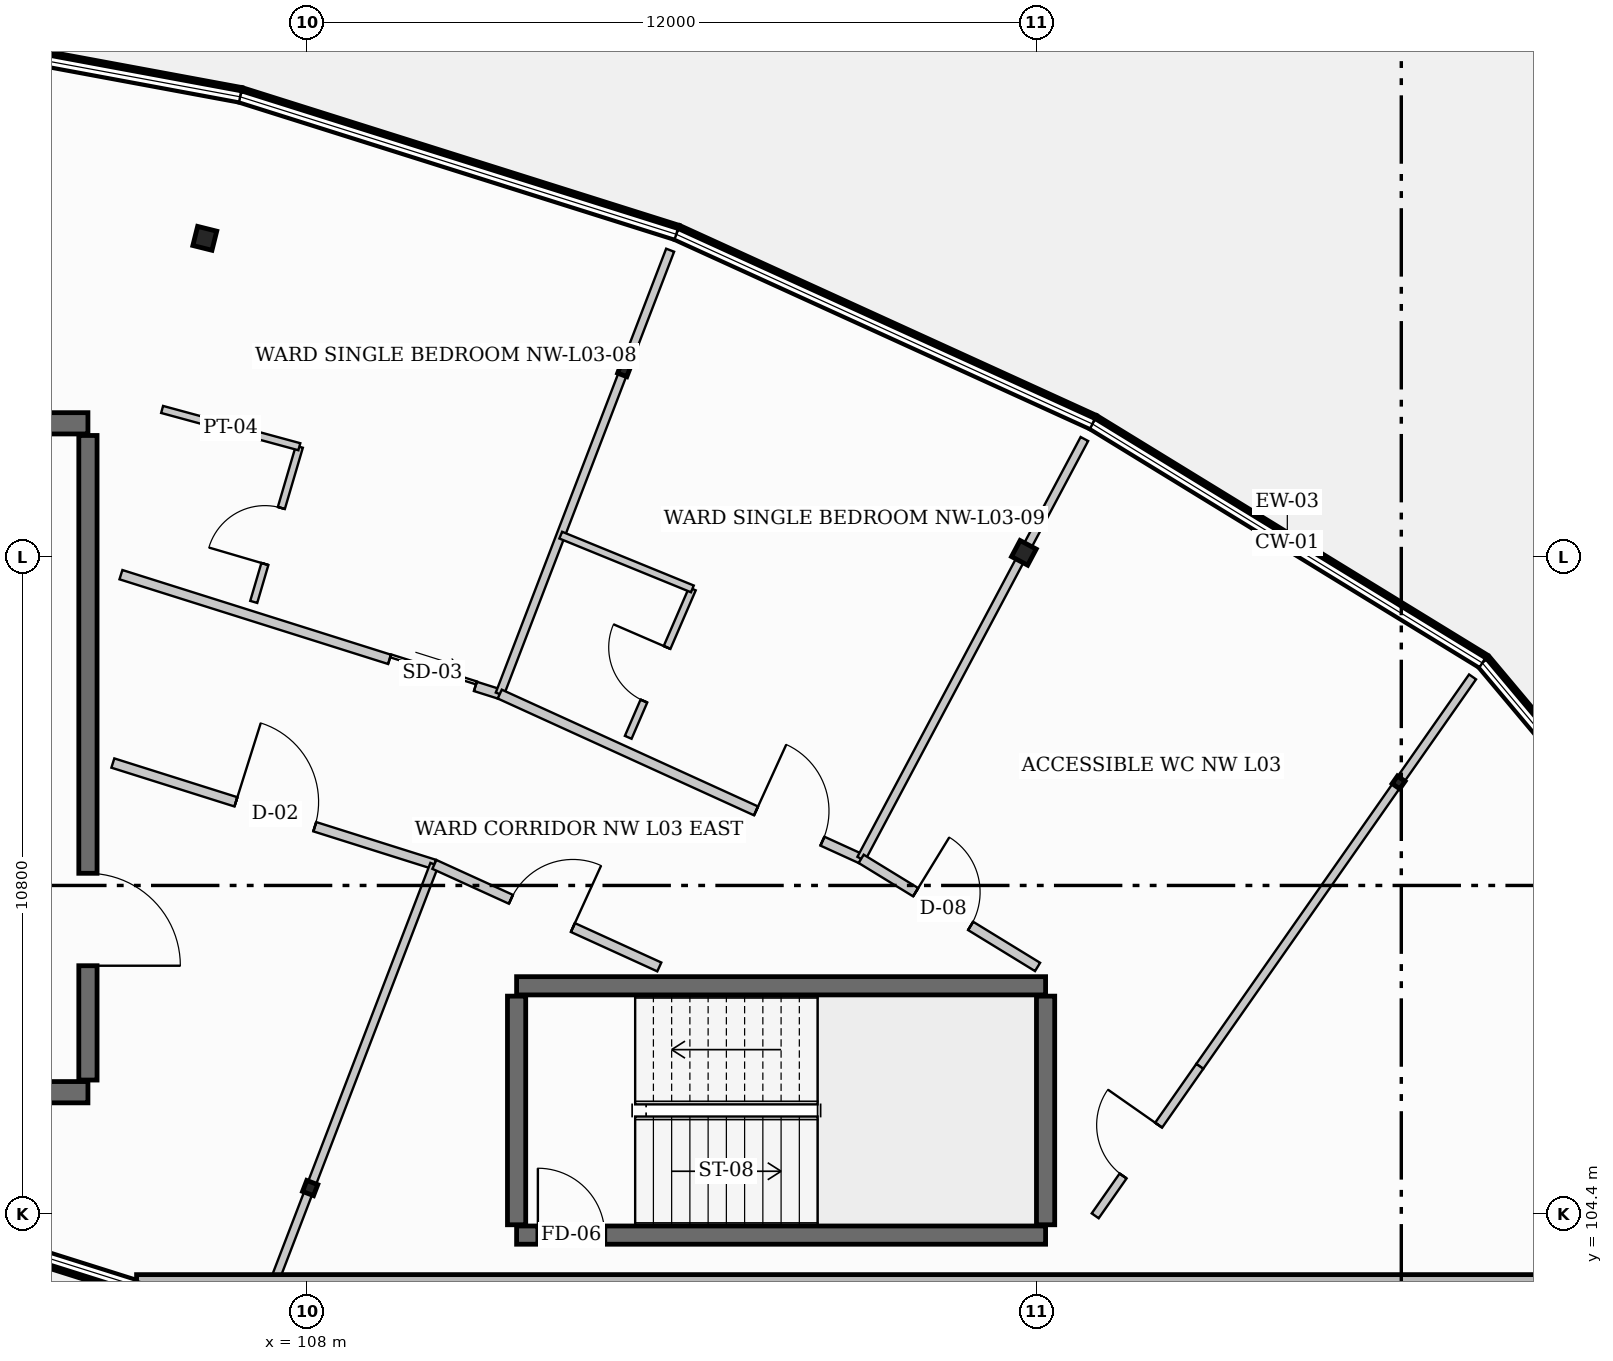
"""IFC4 building model, lengths in metres.
Left out: names, types, materials, properties, quantities, classifications, styles, units other than length and angle.
Written with IfcOpenShell. Run it as: python <this file> out.ifc"""

import sys

from ifc_helpers import new_model, si_unit, direction, frame, frame_2d, origin, origin_2d, place, context, subcontext, project, spatial, rectangle, hollow_rectangle, hollow_circle, i_section, extrude, element, fill, save


model = new_model("IFC4")
c1 = context("Model", 3, precision=1e-05, world=origin(), true_north=direction((0.0, 1.0)))
c2 = subcontext(c1, "Body", "Model", "MODEL_VIEW")
j1 = project(units=[si_unit("LENGTHUNIT", "METRE"), si_unit("PLANEANGLEUNIT", "RADIAN")], contexts=[c1])
p1 = place(None, origin())
s1 = spatial("IfcSite", under=j1, at=p1, CompositionType="ELEMENT")
p2 = place(p1, origin())
s2 = spatial("IfcBuilding", under=s1, at=p2, CompositionType="ELEMENT")
p3 = place(p2, frame((0.0, 0.0, 14.4)))
s3 = spatial("IfcBuildingStorey", under=s2, at=p3, CompositionType="ELEMENT", Elevation=14.4)
p4 = place(p3, frame((106.322, 120.442, 0.0), z_axis=(0.0, 0.0, 1.0), x_axis=(0.2419218956, 0.970295726276, 0.0)))
e1 = element("IfcColumn", 1, at=p4, inside=s3, PredefinedType="COLUMN", context=c2, shape_type="SweptSolid", body=[
    extrude(hollow_circle(Radius=0.162, WallThickness=0.013, at=origin_2d()), origin(), (0.0, 0.0, 1.0), 3.9),
])
p5 = place(p3, frame((113.215, 118.268, 0.0), z_axis=(0.0, 0.0, 1.0), x_axis=(0.358367949545, 0.933580426497, 0.0)))
e2 = element("IfcColumn", 2, at=p5, inside=s3, PredefinedType="COLUMN", context=c2, shape_type="SweptSolid", body=[
    extrude(i_section(OverallWidth=0.154, OverallDepth=0.162, WebThickness=0.008, FlangeThickness=0.011, at=origin_2d()), origin(), (0.0, 0.0, 1.0), 3.9),
])
p6 = place(p3, frame((108.055, 104.824, 0.0), z_axis=(0.0, 0.0, 1.0), x_axis=(0.358367949545, 0.933580426497, 0.0)))
e3 = element("IfcColumn", 3, at=p6, inside=s3, PredefinedType="COLUMN", context=c2, shape_type="SweptSolid", body=[
    extrude(hollow_circle(Radius=0.097, WallThickness=0.008, at=origin_2d()), origin(), (0.0, 0.0, 1.0), 3.9),
])
p7 = place(p3, frame((119.793, 115.27, 0.0), z_axis=(0.0, 0.0, 1.0), x_axis=(0.469471562786, 0.882947592859, 0.0)))
e4 = element("IfcColumn", 4, at=p7, inside=s3, PredefinedType="COLUMN", context=c2, shape_type="SweptSolid", body=[
    extrude(hollow_rectangle(XDim=0.3, YDim=0.3, WallThickness=0.012, at=origin_2d()), origin(), (0.0, 0.0, 1.0), 3.9),
])
p8 = place(p3, frame((125.956, 111.494, 0.0), z_axis=(0.0, 0.0, 1.0), x_axis=(0.573576436351, 0.819152044289, 0.0)))
e5 = element("IfcColumn", 5, at=p8, inside=s3, PredefinedType="COLUMN", context=c2, shape_type="SweptSolid", body=[
    extrude(i_section(OverallWidth=0.152, OverallDepth=0.152, WebThickness=0.006, FlangeThickness=0.007, at=origin_2d()), origin(), (0.0, 0.0, 1.0), 3.9),
])
p9 = place(p3, frame((84.0, 117.4, 0.0), z_axis=(0.0, 0.0, 1.0), x_axis=(1.0, 0.0, 0.0)))
e6 = element("IfcWall", 6, at=p9, inside=s3, PredefinedType="SHEAR", context=c2, shape_type="SweptSolid", body=[
    extrude(rectangle(XDim=20.4, YDim=0.35, at=frame_2d((10.2, 0.0))), origin(), (0.0, 0.0, 1.0), 3.9),
])
p10 = place(p3, frame((104.4, 106.4, 0.0), z_axis=(0.0, 0.0, 1.0), x_axis=(-1.0, 0.0, 0.0)))
e7 = element("IfcWall", 7, at=p10, inside=s3, PredefinedType="SHEAR", context=c2, shape_type="SweptSolid", body=[
    extrude(rectangle(XDim=20.4, YDim=0.35, at=frame_2d((10.2, 0.0))), origin(), (0.0, 0.0, 1.0), 3.9),
])
p11 = place(p10, frame((2.2, 0.0, 0.0)))
e8 = element("IfcOpeningElement", 8, at=p11, cuts=e7, PredefinedType="OPENING", context=c2, shape_type="SweptSolid", body=[
    extrude(rectangle(XDim=1.64, YDim=2.2, at=frame_2d((0.82, 1.1))), frame((0.0, 0.185, 0.0), z_axis=(0.0, -1.0, 0.0), x_axis=(1.0, 0.0, 0.0)), (0.0, 0.0, 1.0), 0.37),
])
p12 = place(p10, frame((13.0, 0.0, 0.0)))
e9 = element("IfcOpeningElement", 9, at=p12, cuts=e7, PredefinedType="OPENING", context=c2, shape_type="SweptSolid", body=[
    extrude(rectangle(XDim=1.52, YDim=2.16, at=frame_2d((0.76, 1.08))), frame((0.0, 0.185, 0.0), z_axis=(0.0, -1.0, 0.0), x_axis=(1.0, 0.0, 0.0)), (0.0, 0.0, 1.0), 0.37),
])
p13 = place(p3, frame((104.4, 117.2, 0.0), z_axis=(0.0, 0.0, 1.0), x_axis=(0.0, -1.0, 0.0)))
e10 = element("IfcWall", 10, at=p13, inside=s3, PredefinedType="SHEAR", context=c2, shape_type="SweptSolid", body=[
    extrude(rectangle(XDim=10.6, YDim=0.3, at=frame_2d((5.3, 0.0))), origin(), (0.0, 0.0, 1.0), 3.9),
])
p14 = place(p13, frame((7.2, 0.0, 0.0)))
e11 = element("IfcOpeningElement", 11, at=p14, cuts=e10, PredefinedType="OPENING", context=c2, shape_type="SweptSolid", body=[
    extrude(rectangle(XDim=1.52, YDim=2.16, at=frame_2d((0.76, 1.08))), frame((0.0, 0.16, 0.0), z_axis=(0.0, -1.0, 0.0), x_axis=(1.0, 0.0, 0.0)), (0.0, 0.0, 1.0), 0.32),
])
p15 = place(p3, frame((111.45, 104.05, 0.0), z_axis=(0.0, 0.0, 1.0), x_axis=(1.0, 0.0, 0.0)))
e12 = element("IfcWall", 12, at=p15, inside=s3, PredefinedType="SHEAR", context=c2, shape_type="SweptSolid", body=[
    extrude(rectangle(XDim=8.7, YDim=0.3, at=frame_2d((4.35, 0.0))), origin(), (0.0, 0.0, 1.0), 3.9),
])
p16 = place(p15, frame((0.35, 0.0, 0.0)))
e13 = element("IfcOpeningElement", 13, at=p16, cuts=e12, PredefinedType="OPENING", context=c2, shape_type="SweptSolid", body=[
    extrude(rectangle(XDim=1.1, YDim=2.15, at=frame_2d((0.55, 1.075))), frame((0.0, 0.16, 0.0), z_axis=(0.0, -1.0, 0.0), x_axis=(1.0, 0.0, 0.0)), (0.0, 0.0, 1.0), 0.32),
])
p17 = place(p3, frame((120.15, 108.15, 0.0), z_axis=(0.0, 0.0, 1.0), x_axis=(-1.0, 0.0, 0.0)))
e14 = element("IfcWall", 14, at=p17, inside=s3, PredefinedType="SHEAR", context=c2, shape_type="SweptSolid", body=[
    extrude(rectangle(XDim=8.7, YDim=0.3, at=frame_2d((4.35, 0.0))), origin(), (0.0, 0.0, 1.0), 3.9),
])
for number, where, z_axis, x_axis in (
    (15, (111.45, 104.22, 0.0), (0.0, 0.0, 1.0), (0.0, 1.0, 0.0)),
    (16, (120.15, 104.22, 0.0), (0.0, 0.0, 1.0), (0.0, 1.0, 0.0)),
):
    element("IfcWall", number, at=place(p3, frame(where, z_axis=z_axis, x_axis=x_axis)), inside=s3, PredefinedType="SHEAR", context=c2, shape_type="SweptSolid", body=[
        extrude(rectangle(XDim=3.76, YDim=0.3, at=frame_2d((1.88, 0.0))), origin(), (0.0, 0.0, 1.0), 3.9),
    ])
p18 = place(p3, frame((107.195, 102.584, 0.0), z_axis=(0.0, 0.0, 1.0), x_axis=(-0.953706582316, 0.300738681994, 0.0)))
e17 = element("IfcWall", 17, at=p18, inside=s3, PredefinedType="STANDARD", context=c2, shape_type="SweptSolid", body=[
    extrude(rectangle(XDim=5.178, YDim=0.22, at=frame_2d((2.589, 0.0))), origin(), (0.0, 0.0, 1.0), 1.05),
])
p19 = place(p3, frame((127.332, 113.46, 0.0), z_axis=(0.0, 0.0, 1.0), x_axis=(0.642871763415, -0.765973821879, 0.0)))
e18 = element("IfcWall", 18, at=p19, inside=s3, PredefinedType="STANDARD", context=c2, shape_type="SweptSolid", body=[
    extrude(rectangle(XDim=4.97, YDim=0.22, at=frame_2d((2.485, 0.0))), origin(), (0.0, 0.0, 1.0), 1.05),
])
p20 = place(p3, frame((120.919, 117.39, 0.0), z_axis=(0.0, 0.0, 1.0), x_axis=(0.852640903338, -0.522497358803, 0.0)))
e19 = element("IfcWall", 19, at=p20, inside=s3, PredefinedType="STANDARD", context=c2, shape_type="SweptSolid", body=[
    extrude(rectangle(XDim=7.521, YDim=0.22, at=frame_2d((3.761, 0.0))), origin(), (0.0, 0.0, 1.0), 1.05),
])
p21 = place(p3, frame((114.075, 120.509, 0.0), z_axis=(0.0, 0.0, 1.0), x_axis=(0.909953604353, -0.414710064895, 0.0)))
e20 = element("IfcWall", 20, at=p21, inside=s3, PredefinedType="STANDARD", context=c2, shape_type="SweptSolid", body=[
    extrude(rectangle(XDim=7.521, YDim=0.22, at=frame_2d((3.761, 0.0))), origin(), (0.0, 0.0, 1.0), 1.05),
])
p22 = place(p3, frame((106.902, 122.77, 0.0), z_axis=(0.0, 0.0, 1.0), x_axis=(0.953740021466, -0.300632618747, 0.0)))
e21 = element("IfcWall", 21, at=p22, inside=s3, PredefinedType="STANDARD", context=c2, shape_type="SweptSolid", body=[
    extrude(rectangle(XDim=7.521, YDim=0.22, at=frame_2d((3.76, 0.0))), origin(), (0.0, 0.0, 1.0), 1.05),
])
p23 = place(p3, frame((99.507, 124.141, 0.0), z_axis=(0.0, 0.0, 1.0), x_axis=(0.983242805192, -0.18230081195, 0.0)))
e22 = element("IfcWall", 22, at=p23, inside=s3, PredefinedType="STANDARD", context=c2, shape_type="SweptSolid", body=[
    extrude(rectangle(XDim=7.521, YDim=0.22, at=frame_2d((3.76, 0.0))), origin(), (0.0, 0.0, 1.0), 1.05),
])
p24 = place(p3, frame((107.127, 114.463, 0.0), z_axis=(0.0, 0.0, 1.0), x_axis=(0.281962578993, 0.959425403066, 0.0)))
e23 = element("IfcWall", 23, at=p24, inside=s3, PredefinedType="PARTITIONING", context=c2, shape_type="SweptSolid", body=[
    extrude(rectangle(XDim=2.66, YDim=0.12, at=frame_2d((1.33, 0.0))), origin(), (0.0, 0.0, 1.0), 3.289),
])
p25 = place(p24, frame((0.65, 0.0, 0.0)))
e24 = element("IfcOpeningElement", 24, at=p25, cuts=e23, PredefinedType="OPENING", context=c2, shape_type="SweptSolid", body=[
    extrude(rectangle(XDim=0.96, YDim=2.06, at=frame_2d((0.48, 1.03))), frame((0.0, 0.07, 0.0), z_axis=(0.0, -1.0, 0.0), x_axis=(1.0, 0.0, 0.0)), (0.0, 0.0, 1.0), 0.14),
])
p26 = place(p3, frame((105.62, 117.628, 0.0), z_axis=(0.0, 0.0, 1.0), x_axis=(0.965030735715, -0.262136756532, 0.0)))
e25 = element("IfcWall", 25, at=p26, inside=s3, PredefinedType="PARTITIONING", context=c2, shape_type="SweptSolid", body=[
    extrude(rectangle(XDim=2.339, YDim=0.12, at=frame_2d((1.169, 0.0))), origin(), (0.0, 0.0, 1.0), 3.085),
])
p27 = place(p3, frame((104.943, 114.911, 0.0), z_axis=(0.0, 0.0, 1.0), x_axis=(0.953736183483, -0.30064479426, 0.0)))
e26 = element("IfcWall", 26, at=p27, inside=s3, PredefinedType="PARTITIONING", context=c2, shape_type="SweptSolid", body=[
    extrude(rectangle(XDim=6.532, YDim=0.16, at=frame_2d((3.266, 0.0))), origin(), (0.0, 0.0, 1.0), 3.085),
])
p28 = place(p27, frame((4.632, 0.0, 0.0)))
e27 = element("IfcOpeningElement", 27, at=p28, cuts=e26, PredefinedType="OPENING", context=c2, shape_type="SweptSolid", body=[
    extrude(rectangle(XDim=1.48, YDim=2.26, at=frame_2d((0.74, 1.13))), frame((0.0, 0.09, 0.0), z_axis=(0.0, -1.0, 0.0), x_axis=(1.0, 0.0, 0.0)), (0.0, 0.0, 1.0), 0.18),
])
p29 = place(p3, frame((111.173, 112.947, 0.0), z_axis=(0.0, 0.0, 1.0), x_axis=(0.358342954102, 0.933590020965, 0.0)))
e28 = element("IfcWall", 28, at=p29, inside=s3, PredefinedType="PARTITIONING", context=c2, shape_type="SweptSolid", body=[
    extrude(rectangle(XDim=7.819, YDim=0.14, at=frame_2d((3.91, 0.0))), origin(), (0.0, 0.0, 1.0), 3.088),
])
p30 = place(p3, frame((104.81, 111.813, 0.0), z_axis=(0.0, 0.0, 1.0), x_axis=(0.953730291319, -0.300663485347, 0.0)))
e29 = element("IfcWall", 29, at=p30, inside=s3, PredefinedType="PARTITIONING", context=c2, shape_type="SweptSolid", body=[
    extrude(rectangle(XDim=5.544, YDim=0.16, at=frame_2d((2.772, 0.0))), origin(), (0.0, 0.0, 1.0), 3.088),
])
p31 = place(p30, frame((2.122, 0.0, 0.0)))
e30 = element("IfcOpeningElement", 30, at=p31, cuts=e29, PredefinedType="OPENING", context=c2, shape_type="SweptSolid", body=[
    extrude(rectangle(XDim=1.36, YDim=2.18, at=frame_2d((0.68, 1.09))), frame((0.0, 0.09, 0.0), z_axis=(0.0, -1.0, 0.0), x_axis=(1.0, 0.0, 0.0)), (0.0, 0.0, 1.0), 0.18),
])
p32 = place(p3, frame((110.098, 110.146, 0.0), z_axis=(0.0, 0.0, 1.0), x_axis=(-0.358410014332, -0.933564278251, 0.0)))
e31 = element("IfcWall", 31, at=p32, inside=s3, PredefinedType="PARTITIONING", context=c2, shape_type="SweptSolid", body=[
    extrude(rectangle(XDim=7.821, YDim=0.14, at=frame_2d((3.91, 0.0))), origin(), (0.0, 0.0, 1.0), 3.088),
])
p33 = place(p3, frame((113.286, 112.236, 0.0), z_axis=(0.0, 0.0, 1.0), x_axis=(0.396798265053, 0.917905843129, 0.0)))
e32 = element("IfcWall", 32, at=p33, inside=s3, PredefinedType="PARTITIONING", context=c2, shape_type="SweptSolid", body=[
    extrude(rectangle(XDim=2.659, YDim=0.12, at=frame_2d((1.33, 0.0))), origin(), (0.0, 0.0, 1.0), 3.56),
])
p34 = place(p33, frame((0.65, 0.0, 0.0)))
e33 = element("IfcOpeningElement", 33, at=p34, cuts=e32, PredefinedType="OPENING", context=c2, shape_type="SweptSolid", body=[
    extrude(rectangle(XDim=0.96, YDim=2.06, at=frame_2d((0.48, 1.03))), frame((0.0, 0.07, 0.0), z_axis=(0.0, -1.0, 0.0), x_axis=(1.0, 0.0, 0.0)), (0.0, 0.0, 1.0), 0.14),
])
p35 = place(p3, frame((112.176, 115.561, 0.0), z_axis=(0.0, 0.0, 1.0), x_axis=(0.925796200481, -0.378023008789, 0.0)))
e34 = element("IfcWall", 34, at=p35, inside=s3, PredefinedType="PARTITIONING", context=c2, shape_type="SweptSolid", body=[
    extrude(rectangle(XDim=2.339, YDim=0.12, at=frame_2d((1.169, 0.0))), origin(), (0.0, 0.0, 1.0), 3.088),
])
p36 = place(p3, frame((111.173, 112.947, 0.0), z_axis=(0.0, 0.0, 1.0), x_axis=(0.909948737979, -0.414720742488, 0.0)))
e35 = element("IfcWall", 35, at=p36, inside=s3, PredefinedType="PARTITIONING", context=c2, shape_type="SweptSolid", body=[
    extrude(rectangle(XDim=6.532, YDim=0.16, at=frame_2d((3.266, 0.0))), origin(), (0.0, 0.0, 1.0), 3.088),
])
p37 = place(p36, frame((4.632, 0.0, 0.0)))
e36 = element("IfcOpeningElement", 36, at=p37, cuts=e35, PredefinedType="OPENING", context=c2, shape_type="SweptSolid", body=[
    extrude(rectangle(XDim=1.2, YDim=2.12, at=frame_2d((0.6, 1.06))), frame((0.0, 0.09, 0.0), z_axis=(0.0, -1.0, 0.0), x_axis=(1.0, 0.0, 0.0)), (0.0, 0.0, 1.0), 0.18),
])
p38 = place(p3, frame((117.117, 110.238, 0.0), z_axis=(0.0, 0.0, 1.0), x_axis=(0.469490767167, 0.88293738144, 0.0)))
e37 = element("IfcWall", 37, at=p38, inside=s3, PredefinedType="PARTITIONING", context=c2, shape_type="SweptSolid", body=[
    extrude(rectangle(XDim=7.819, YDim=0.14, at=frame_2d((3.91, 0.0))), origin(), (0.0, 0.0, 1.0), 3.091),
])
p39 = place(p3, frame((110.098, 110.146, 0.0), z_axis=(0.0, 0.0, 1.0), x_axis=(0.909942329762, -0.414734802623, 0.0)))
e38 = element("IfcWall", 38, at=p39, inside=s3, PredefinedType="PARTITIONING", context=c2, shape_type="SweptSolid", body=[
    extrude(rectangle(XDim=4.065, YDim=0.16, at=frame_2d((2.033, 0.0))), origin(), (0.0, 0.0, 1.0), 3.088),
])
p40 = place(p39, frame((1.383, 0.0, 0.0)))
e39 = element("IfcOpeningElement", 39, at=p40, cuts=e38, PredefinedType="OPENING", context=c2, shape_type="SweptSolid", body=[
    extrude(rectangle(XDim=1.12, YDim=2.08, at=frame_2d((0.56, 1.04))), frame((0.0, 0.09, 0.0), z_axis=(0.0, -1.0, 0.0), x_axis=(1.0, 0.0, 0.0)), (0.0, 0.0, 1.0), 0.18),
])
p41 = place(p3, frame((117.117, 110.238, 0.0), z_axis=(0.0, 0.0, 1.0), x_axis=(0.852605377196, -0.522555327957, 0.0)))
e40 = element("IfcWall", 40, at=p41, inside=s3, PredefinedType="PARTITIONING", context=c2, shape_type="SweptSolid", body=[
    extrude(rectangle(XDim=3.403, YDim=0.16, at=frame_2d((1.701, 0.0))), origin(), (0.0, 0.0, 1.0), 3.56),
])
p42 = place(p41, frame((1.051, 0.0, 0.0)))
e41 = element("IfcOpeningElement", 41, at=p42, cuts=e40, PredefinedType="OPENING", context=c2, shape_type="SweptSolid", body=[
    extrude(rectangle(XDim=1.06, YDim=2.1, at=frame_2d((0.53, 1.05))), frame((0.0, 0.09, 0.0), z_axis=(0.0, -1.0, 0.0), x_axis=(1.0, 0.0, 0.0)), (0.0, 0.0, 1.0), 0.18),
])
p43 = place(p3, frame((122.686, 106.825, 0.0), z_axis=(0.0, 0.0, 1.0), x_axis=(0.573682336084, 0.819077882295, 0.0)))
e42 = element("IfcWall", 42, at=p43, inside=s3, PredefinedType="PARTITIONING", context=c2, shape_type="SweptSolid", body=[
    extrude(rectangle(XDim=7.82, YDim=0.14, at=frame_2d((3.91, 0.0))), origin(), (0.0, 0.0, 1.0), 3.142),
])
p44 = place(p3, frame((120.966, 104.367, 0.0), z_axis=(0.0, 0.0, 1.0), x_axis=(0.573320330817, 0.819331311663, 0.0)))
e43 = element("IfcWall", 43, at=p44, inside=s3, PredefinedType="PARTITIONING", context=c2, shape_type="SweptSolid", body=[
    extrude(rectangle(XDim=3.0, YDim=0.14, at=frame_2d((1.5, 0.0))), origin(), (0.0, 0.0, 1.0), 3.56),
])
p45 = place(p44, frame((0.8, 0.0, 0.0)))
e44 = element("IfcOpeningElement", 44, at=p45, cuts=e43, PredefinedType="OPENING", context=c2, shape_type="SweptSolid", body=[
    extrude(rectangle(XDim=1.02, YDim=2.08, at=frame_2d((0.51, 1.04))), frame((0.0, 0.08, 0.0), z_axis=(0.0, -1.0, 0.0), x_axis=(1.0, 0.0, 0.0)), (0.0, 0.0, 1.0), 0.16),
])
p46 = place(p16, origin())
e45 = element("IfcDoor", 45, at=p46, inside=s3, OperationType="SINGLE_SWING_LEFT", PredefinedType="DOOR", context=c2, shape_type="SweptSolid", body=[
    extrude(rectangle(XDim=1.1, YDim=2.15, at=frame_2d((0.55, 1.075))), frame((0.0, 0.025, 0.0), z_axis=(0.0, -1.0, 0.0), x_axis=(1.0, 0.0, 0.0)), (0.0, 0.0, 1.0), 0.05),
])
fill(e13, e45)
p47 = place(p14, origin())
e46 = element("IfcDoor", 46, at=p47, inside=s3, OperationType="SINGLE_SWING_RIGHT", PredefinedType="DOOR", context=c2, shape_type="SweptSolid", body=[
    extrude(rectangle(XDim=1.52, YDim=2.16, at=frame_2d((0.76, 1.08))), frame((0.0, 0.025, 0.0), z_axis=(0.0, -1.0, 0.0), x_axis=(1.0, 0.0, 0.0)), (0.0, 0.0, 1.0), 0.05),
])
fill(e11, e46)
p48 = place(p25, origin())
e47 = element("IfcDoor", 47, at=p48, inside=s3, OperationType="SINGLE_SWING_LEFT", PredefinedType="DOOR", context=c2, shape_type="SweptSolid", body=[
    extrude(rectangle(XDim=0.96, YDim=2.06, at=frame_2d((0.48, 1.03))), frame((0.0, 0.025, 0.0), z_axis=(0.0, -1.0, 0.0), x_axis=(1.0, 0.0, 0.0)), (0.0, 0.0, 1.0), 0.05),
])
fill(e24, e47)
p49 = place(p28, origin())
e48 = element("IfcDoor", 48, at=p49, inside=s3, OperationType="SLIDING_TO_LEFT", PredefinedType="DOOR", context=c2, shape_type="SweptSolid", body=[
    extrude(rectangle(XDim=1.48, YDim=2.26, at=frame_2d((0.74, 1.13))), frame((0.0, 0.025, 0.0), z_axis=(0.0, -1.0, 0.0), x_axis=(1.0, 0.0, 0.0)), (0.0, 0.0, 1.0), 0.05),
])
fill(e27, e48)
p50 = place(p31, origin())
e49 = element("IfcDoor", 49, at=p50, inside=s3, OperationType="SINGLE_SWING_LEFT", PredefinedType="DOOR", context=c2, shape_type="SweptSolid", body=[
    extrude(rectangle(XDim=1.36, YDim=2.18, at=frame_2d((0.68, 1.09))), frame((0.0, 0.025, 0.0), z_axis=(0.0, -1.0, 0.0), x_axis=(1.0, 0.0, 0.0)), (0.0, 0.0, 1.0), 0.05),
])
fill(e30, e49)
p51 = place(p34, origin())
e50 = element("IfcDoor", 50, at=p51, inside=s3, OperationType="SINGLE_SWING_RIGHT", PredefinedType="DOOR", context=c2, shape_type="SweptSolid", body=[
    extrude(rectangle(XDim=0.96, YDim=2.06, at=frame_2d((0.48, 1.03))), frame((0.0, 0.025, 0.0), z_axis=(0.0, -1.0, 0.0), x_axis=(1.0, 0.0, 0.0)), (0.0, 0.0, 1.0), 0.05),
])
fill(e33, e50)
p52 = place(p37, origin())
e51 = element("IfcDoor", 51, at=p52, inside=s3, OperationType="SINGLE_SWING_LEFT", PredefinedType="DOOR", context=c2, shape_type="SweptSolid", body=[
    extrude(rectangle(XDim=1.2, YDim=2.12, at=frame_2d((0.6, 1.06))), frame((0.0, 0.025, 0.0), z_axis=(0.0, -1.0, 0.0), x_axis=(1.0, 0.0, 0.0)), (0.0, 0.0, 1.0), 0.05),
])
fill(e36, e51)
p53 = place(p40, origin())
e52 = element("IfcDoor", 52, at=p53, inside=s3, OperationType="SINGLE_SWING_RIGHT", PredefinedType="DOOR", context=c2, shape_type="SweptSolid", body=[
    extrude(rectangle(XDim=1.12, YDim=2.08, at=frame_2d((0.56, 1.04))), frame((0.0, 0.025, 0.0), z_axis=(0.0, -1.0, 0.0), x_axis=(1.0, 0.0, 0.0)), (0.0, 0.0, 1.0), 0.05),
])
fill(e39, e52)
p54 = place(p42, origin())
e53 = element("IfcDoor", 53, at=p54, inside=s3, OperationType="SINGLE_SWING_LEFT", PredefinedType="DOOR", context=c2, shape_type="SweptSolid", body=[
    extrude(rectangle(XDim=1.06, YDim=2.1, at=frame_2d((0.53, 1.05))), frame((0.0, 0.025, 0.0), z_axis=(0.0, -1.0, 0.0), x_axis=(1.0, 0.0, 0.0)), (0.0, 0.0, 1.0), 0.05),
])
fill(e41, e53)
p55 = place(p45, origin())
e54 = element("IfcDoor", 54, at=p55, inside=s3, OperationType="SINGLE_SWING_RIGHT", PredefinedType="DOOR", context=c2, shape_type="SweptSolid", body=[
    extrude(rectangle(XDim=1.02, YDim=2.08, at=frame_2d((0.51, 1.04))), frame((0.0, 0.025, 0.0), z_axis=(0.0, -1.0, 0.0), x_axis=(1.0, 0.0, 0.0)), (0.0, 0.0, 1.0), 0.05),
])
fill(e44, e54)
save(model, sys.argv[1])
